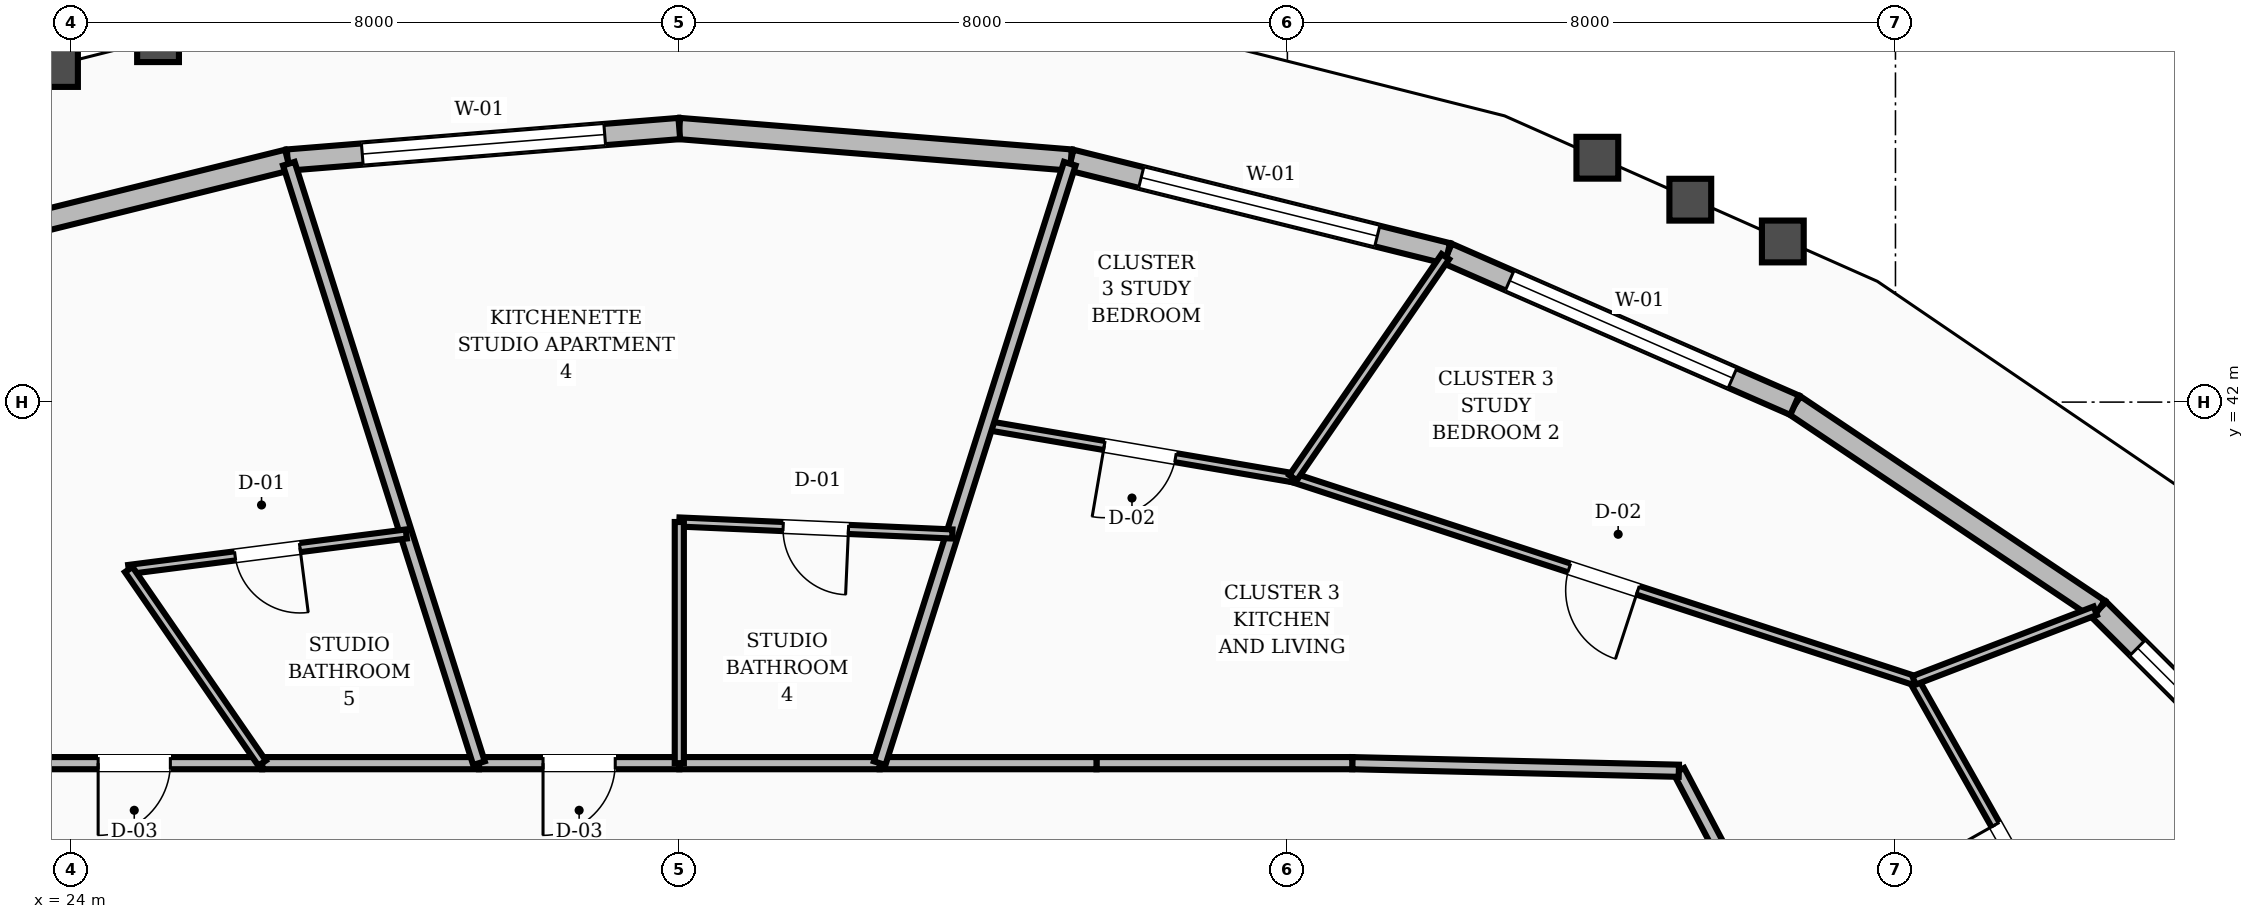
"""IFC4 building model, lengths in metres.
Left out: names, types, materials, properties, quantities, classifications, styles, units other than length and angle.
Written with IfcOpenShell. Run it as: python <this file> out.ifc"""

import sys

from ifc_helpers import new_model, si_unit, direction, frame, frame_2d, origin, place, context, subcontext, project, spatial, rectangle, extrude, element, fill, save


model = new_model("IFC4")
c1 = context("Model", 3, precision=1e-05, world=origin(), true_north=direction((0.0, 1.0)))
c2 = subcontext(c1, "Body", "Model", "MODEL_VIEW")
j1 = project(units=[si_unit("LENGTHUNIT", "METRE"), si_unit("PLANEANGLEUNIT", "RADIAN")], contexts=[c1])
p1 = place(None, origin())
s1 = spatial("IfcSite", under=j1, at=p1, CompositionType="ELEMENT")
p2 = place(p1, origin())
s2 = spatial("IfcBuilding", under=s1, at=p2, CompositionType="ELEMENT")
p3 = place(p2, frame((0.0, 0.0, 146.0)))
s3 = spatial("IfcBuildingStorey", under=s2, at=p3, CompositionType="ELEMENT", Elevation=146.0)
p4 = place(p3, frame((53.959, 36.0, 0.0), z_axis=(0.0, 0.0, 1.0), x_axis=(-0.708343047993, 0.70586834917, 0.0)))
e1 = element("IfcWall", 1, at=p4, inside=s3, PredefinedType="STANDARD", context=c2, shape_type="SweptSolid", body=[
    extrude(rectangle(XDim=4.637, YDim=0.28, at=frame_2d((2.318, 0.0))), origin(), (0.0, 0.0, 1.0), 2.82),
])
p5 = place(p4, frame((0.719, 0.0, 0.8)))
e2 = element("IfcOpeningElement", 2, at=p5, cuts=e1, PredefinedType="OPENING", context=c2, shape_type="SweptSolid", body=[
    extrude(rectangle(XDim=3.2, YDim=1.65, at=frame_2d((1.6, 0.825))), frame((0.0, 0.15, 0.0), z_axis=(0.0, -1.0, 0.0), x_axis=(1.0, 0.0, 0.0)), (0.0, 0.0, 1.0), 0.3),
])
p6 = place(p3, frame((50.675, 39.273, 0.0), z_axis=(0.0, 0.0, 1.0), x_axis=(-0.830308520581, 0.557304010977, 0.0)))
e3 = element("IfcWall", 3, at=p6, inside=s3, PredefinedType="STANDARD", context=c2, shape_type="SweptSolid", body=[
    extrude(rectangle(XDim=4.82, YDim=0.28, at=frame_2d((2.41, 0.0))), origin(), (0.0, 0.0, 1.0), 2.82),
])
p7 = place(p3, frame((46.673, 41.959, 0.0), z_axis=(0.0, 0.0, 1.0), x_axis=(-0.916285475586, 0.400525813438, 0.0)))
e4 = element("IfcWall", 4, at=p7, inside=s3, PredefinedType="STANDARD", context=c2, shape_type="SweptSolid", body=[
    extrude(rectangle(XDim=4.983, YDim=0.28, at=frame_2d((2.492, 0.0))), origin(), (0.0, 0.0, 1.0), 2.82),
])
p8 = place(p7, frame((0.892, 0.0, 0.8)))
e5 = element("IfcOpeningElement", 5, at=p8, cuts=e4, PredefinedType="OPENING", context=c2, shape_type="SweptSolid", body=[
    extrude(rectangle(XDim=3.2, YDim=1.65, at=frame_2d((1.6, 0.825))), frame((0.0, 0.15, 0.0), z_axis=(0.0, -1.0, 0.0), x_axis=(1.0, 0.0, 0.0)), (0.0, 0.0, 1.0), 0.3),
])
p9 = place(p3, frame((42.107, 43.955, 0.0), z_axis=(0.0, 0.0, 1.0), x_axis=(-0.970574196652, 0.240802260774, 0.0)))
e6 = element("IfcWall", 6, at=p9, inside=s3, PredefinedType="STANDARD", context=c2, shape_type="SweptSolid", body=[
    extrude(rectangle(XDim=5.105, YDim=0.28, at=frame_2d((2.552, 0.0))), origin(), (0.0, 0.0, 1.0), 2.82),
])
p10 = place(p9, frame((0.952, 0.0, 0.8)))
e7 = element("IfcOpeningElement", 7, at=p10, cuts=e6, PredefinedType="OPENING", context=c2, shape_type="SweptSolid", body=[
    extrude(rectangle(XDim=3.2, YDim=1.65, at=frame_2d((1.6, 0.825))), frame((0.0, 0.15, 0.0), z_axis=(0.0, -1.0, 0.0), x_axis=(1.0, 0.0, 0.0)), (0.0, 0.0, 1.0), 0.3),
])
p11 = place(p3, frame((37.152, 45.184, 0.0), z_axis=(0.0, 0.0, 1.0), x_axis=(-0.996771275463, 0.080293364684, 0.0)))
e8 = element("IfcWall", 8, at=p11, inside=s3, PredefinedType="STANDARD", context=c2, shape_type="SweptSolid", body=[
    extrude(rectangle(XDim=5.169, YDim=0.28, at=frame_2d((2.584, 0.0))), origin(), (0.0, 0.0, 1.0), 2.82),
])
p12 = place(p3, frame((32.0, 45.599, 0.0), z_axis=(0.0, 0.0, 1.0), x_axis=(-0.996771275463, -0.080293364684, 0.0)))
e9 = element("IfcWall", 9, at=p12, inside=s3, PredefinedType="STANDARD", context=c2, shape_type="SweptSolid", body=[
    extrude(rectangle(XDim=5.169, YDim=0.28, at=frame_2d((2.584, 0.0))), origin(), (0.0, 0.0, 1.0), 2.82),
])
p13 = place(p12, frame((0.985, 0.0, 0.8)))
e10 = element("IfcOpeningElement", 10, at=p13, cuts=e9, PredefinedType="OPENING", context=c2, shape_type="SweptSolid", body=[
    extrude(rectangle(XDim=3.2, YDim=1.65, at=frame_2d((1.6, 0.825))), frame((0.0, 0.15, 0.0), z_axis=(0.0, -1.0, 0.0), x_axis=(1.0, 0.0, 0.0)), (0.0, 0.0, 1.0), 0.3),
])
p14 = place(p3, frame((26.848, 45.184, 0.0), z_axis=(0.0, 0.0, 1.0), x_axis=(-0.970574196652, -0.240802260774, 0.0)))
e11 = element("IfcWall", 11, at=p14, inside=s3, PredefinedType="STANDARD", context=c2, shape_type="SweptSolid", body=[
    extrude(rectangle(XDim=5.105, YDim=0.28, at=frame_2d((2.552, 0.0))), origin(), (0.0, 0.0, 1.0), 2.82),
])
p15 = place(p3, frame((46.85, 33.923, 0.0), z_axis=(0.0, 0.0, 1.0), x_axis=(-0.466093963429, 0.884735224378, 0.0)))
e12 = element("IfcWall", 12, at=p15, inside=s3, PredefinedType="SOLIDWALL", context=c2, shape_type="SweptSolid", body=[
    extrude(rectangle(XDim=3.648, YDim=0.16, at=frame_2d((1.824, 0.0))), origin(), (0.0, 0.0, 1.0), 2.8),
])
p16 = place(p15, frame((1.324, 0.0, 0.0)))
e13 = element("IfcOpeningElement", 13, at=p16, cuts=e12, PredefinedType="OPENING", context=c2, shape_type="SweptSolid", body=[
    extrude(rectangle(XDim=1.0, YDim=2.1, at=frame_2d((0.5, 1.05))), frame((0.0, 0.09, 0.0), z_axis=(0.0, -1.0, 0.0), x_axis=(1.0, 0.0, 0.0)), (0.0, 0.0, 1.0), 0.18),
])
p17 = place(p3, frame((45.15, 37.15, 0.0), z_axis=(0.0, 0.0, 1.0), x_axis=(-0.999728709658, 0.023291781507, 0.0)))
e14 = element("IfcWall", 14, at=p17, inside=s3, PredefinedType="SOLIDWALL", context=c2, shape_type="SweptSolid", body=[
    extrude(rectangle(XDim=4.298, YDim=0.16, at=frame_2d((2.149, 0.0))), origin(), (0.0, 0.0, 1.0), 2.8),
])
p18 = place(p3, frame((40.854, 37.25, 0.0), z_axis=(0.0, 0.0, 1.0), x_axis=(-1.0, 0.0, 0.0)))
e15 = element("IfcWall", 15, at=p18, inside=s3, PredefinedType="SOLIDWALL", context=c2, shape_type="SweptSolid", body=[
    extrude(rectangle(XDim=3.365, YDim=0.16, at=frame_2d((1.683, 0.0))), origin(), (0.0, 0.0, 1.0), 2.8),
])
p19 = place(p3, frame((37.488, 37.25, 0.0), z_axis=(0.0, 0.0, 1.0), x_axis=(-1.0, 0.0, 0.0)))
e16 = element("IfcWall", 16, at=p19, inside=s3, PredefinedType="SOLIDWALL", context=c2, shape_type="SweptSolid", body=[
    extrude(rectangle(XDim=2.853, YDim=0.16, at=frame_2d((1.426, 0.0))), origin(), (0.0, 0.0, 1.0), 2.8),
])
p20 = place(p3, frame((34.635, 37.25, 0.0), z_axis=(0.0, 0.0, 1.0), x_axis=(-1.0, 0.0, 0.0)))
e17 = element("IfcWall", 17, at=p20, inside=s3, PredefinedType="SOLIDWALL", context=c2, shape_type="SweptSolid", body=[
    extrude(rectangle(XDim=2.635, YDim=0.16, at=frame_2d((1.318, 0.0))), origin(), (0.0, 0.0, 1.0), 2.8),
])
p21 = place(p3, frame((32.0, 37.25, 0.0), z_axis=(0.0, 0.0, 1.0), x_axis=(-1.0, 0.0, 0.0)))
e18 = element("IfcWall", 18, at=p21, inside=s3, PredefinedType="SOLIDWALL", context=c2, shape_type="SweptSolid", body=[
    extrude(rectangle(XDim=2.635, YDim=0.16, at=frame_2d((1.318, 0.0))), origin(), (0.0, 0.0, 1.0), 2.8),
])
p22 = place(p21, frame((0.843, 0.0, 0.0)))
e19 = element("IfcOpeningElement", 19, at=p22, cuts=e18, PredefinedType="OPENING", context=c2, shape_type="SweptSolid", body=[
    extrude(rectangle(XDim=0.95, YDim=2.1, at=frame_2d((0.475, 1.05))), frame((0.0, 0.09, 0.0), z_axis=(0.0, -1.0, 0.0), x_axis=(1.0, 0.0, 0.0)), (0.0, 0.0, 1.0), 0.18),
])
p23 = place(p3, frame((29.365, 37.25, 0.0), z_axis=(0.0, 0.0, 1.0), x_axis=(-1.0, 0.0, 0.0)))
e20 = element("IfcWall", 20, at=p23, inside=s3, PredefinedType="SOLIDWALL", context=c2, shape_type="SweptSolid", body=[
    extrude(rectangle(XDim=2.853, YDim=0.16, at=frame_2d((1.426, 0.0))), origin(), (0.0, 0.0, 1.0), 2.8),
])
p24 = place(p3, frame((26.512, 37.25, 0.0), z_axis=(0.0, 0.0, 1.0), x_axis=(-1.0, 0.0, 0.0)))
e21 = element("IfcWall", 21, at=p24, inside=s3, PredefinedType="SOLIDWALL", context=c2, shape_type="SweptSolid", body=[
    extrude(rectangle(XDim=3.365, YDim=0.16, at=frame_2d((1.683, 0.0))), origin(), (0.0, 0.0, 1.0), 2.8),
])
p25 = place(p24, frame((1.208, 0.0, 0.0)))
e22 = element("IfcOpeningElement", 22, at=p25, cuts=e21, PredefinedType="OPENING", context=c2, shape_type="SweptSolid", body=[
    extrude(rectangle(XDim=0.95, YDim=2.1, at=frame_2d((0.475, 1.05))), frame((0.0, 0.09, 0.0), z_axis=(0.0, -1.0, 0.0), x_axis=(1.0, 0.0, 0.0)), (0.0, 0.0, 1.0), 0.18),
])
p26 = place(p3, frame((52.198, 31.335, 0.0), z_axis=(0.0, 0.0, 1.0), x_axis=(-0.491634094676, 0.870801881574, 0.0)))
e23 = element("IfcWall", 23, at=p26, inside=s3, PredefinedType="PARTITIONING", context=c2, shape_type="SweptSolid", body=[
    extrude(rectangle(XDim=8.043, YDim=0.12, at=frame_2d((4.021, 0.0))), origin(), (0.0, 0.0, 1.0), 2.8),
])
p27 = place(p26, frame((4.913, 0.0, 0.0)))
e24 = element("IfcOpeningElement", 24, at=p27, cuts=e23, PredefinedType="OPENING", context=c2, shape_type="SweptSolid", body=[
    extrude(rectangle(XDim=0.95, YDim=2.1, at=frame_2d((0.475, 1.05))), frame((0.0, 0.07, 0.0), z_axis=(0.0, -1.0, 0.0), x_axis=(1.0, 0.0, 0.0)), (0.0, 0.0, 1.0), 0.14),
])
p28 = place(p3, frame((48.244, 38.339, 0.0), z_axis=(0.0, 0.0, 1.0), x_axis=(-0.950656085118, 0.310246688667, 0.0)))
e25 = element("IfcWall", 25, at=p28, inside=s3, PredefinedType="PARTITIONING", context=c2, shape_type="SweptSolid", body=[
    extrude(rectangle(XDim=8.593, YDim=0.12, at=frame_2d((4.297, 0.0))), origin(), (0.0, 0.0, 1.0), 2.8),
])
p29 = place(p28, frame((3.822, 0.0, 0.0)))
e26 = element("IfcOpeningElement", 26, at=p29, cuts=e25, PredefinedType="OPENING", context=c2, shape_type="SweptSolid", body=[
    extrude(rectangle(XDim=0.95, YDim=2.1, at=frame_2d((0.475, 1.05))), frame((0.0, 0.07, 0.0), z_axis=(0.0, -1.0, 0.0), x_axis=(1.0, 0.0, 0.0)), (0.0, 0.0, 1.0), 0.14),
])
p30 = place(p3, frame((48.244, 38.339, 0.0), z_axis=(0.0, 0.0, 1.0), x_axis=(0.933458867587, 0.358684460945, 0.0)))
e27 = element("IfcWall", 27, at=p30, inside=s3, PredefinedType="PARTITIONING", context=c2, shape_type="SweptSolid", body=[
    extrude(rectangle(XDim=2.554, YDim=0.12, at=frame_2d((1.277, 0.0))), origin(), (0.0, 0.0, 1.0), 2.8),
])
p31 = place(p3, frame((40.075, 41.005, 0.0), z_axis=(0.0, 0.0, 1.0), x_axis=(-0.985727483478, 0.16834882927, 0.0)))
e28 = element("IfcWall", 28, at=p31, inside=s3, PredefinedType="PARTITIONING", context=c2, shape_type="SweptSolid", body=[
    extrude(rectangle(XDim=4.088, YDim=0.12, at=frame_2d((2.044, 0.0))), origin(), (0.0, 0.0, 1.0), 2.8),
])
p32 = place(p31, frame((1.569, 0.0, 0.0)))
e29 = element("IfcOpeningElement", 29, at=p32, cuts=e28, PredefinedType="OPENING", context=c2, shape_type="SweptSolid", body=[
    extrude(rectangle(XDim=0.95, YDim=2.1, at=frame_2d((0.475, 1.05))), frame((0.0, 0.07, 0.0), z_axis=(0.0, -1.0, 0.0), x_axis=(1.0, 0.0, 0.0)), (0.0, 0.0, 1.0), 0.14),
])
p33 = place(p3, frame((40.075, 41.005, 0.0), z_axis=(0.0, 0.0, 1.0), x_axis=(0.56726774044, 0.8235334302, 0.0)))
e30 = element("IfcWall", 30, at=p33, inside=s3, PredefinedType="PARTITIONING", context=c2, shape_type="SweptSolid", body=[
    extrude(rectangle(XDim=3.532, YDim=0.12, at=frame_2d((1.766, 0.0))), origin(), (0.0, 0.0, 1.0), 2.8),
])
p34 = place(p3, frame((34.635, 37.25, 0.0), z_axis=(0.0, 0.0, 1.0), x_axis=(0.302358297893, 0.953194345186, 0.0)))
e31 = element("IfcWall", 31, at=p34, inside=s3, PredefinedType="SOLIDWALL", context=c2, shape_type="SweptSolid", body=[
    extrude(rectangle(XDim=8.274, YDim=0.16, at=frame_2d((4.137, 0.0))), origin(), (0.0, 0.0, 1.0), 2.8),
])
p35 = place(p3, frame((35.592, 40.265, 0.0), z_axis=(0.0, 0.0, 1.0), x_axis=(-0.999037490114, 0.043864488453, 0.0)))
e32 = element("IfcWall", 32, at=p35, inside=s3, PredefinedType="PARTITIONING", context=c2, shape_type="SweptSolid", body=[
    extrude(rectangle(XDim=3.595, YDim=0.12, at=frame_2d((1.798, 0.0))), origin(), (0.0, 0.0, 1.0), 2.8),
])
p36 = place(p35, frame((1.368, 0.0, 0.0)))
e33 = element("IfcOpeningElement", 33, at=p36, cuts=e32, PredefinedType="OPENING", context=c2, shape_type="SweptSolid", body=[
    extrude(rectangle(XDim=0.86, YDim=2.1, at=frame_2d((0.43, 1.05))), frame((0.0, 0.07, 0.0), z_axis=(0.0, -1.0, 0.0), x_axis=(1.0, 0.0, 0.0)), (0.0, 0.0, 1.0), 0.14),
])
p37 = place(p3, frame((32.0, 37.25, 0.0), z_axis=(0.0, 0.0, 1.0), x_axis=(0.0, 1.0, 0.0)))
e34 = element("IfcWall", 34, at=p37, inside=s3, PredefinedType="PARTITIONING", context=c2, shape_type="SweptSolid", body=[
    extrude(rectangle(XDim=3.173, YDim=0.12, at=frame_2d((1.586, 0.0))), origin(), (0.0, 0.0, 1.0), 2.8),
])
p38 = place(p3, frame((29.365, 37.25, 0.0), z_axis=(0.0, 0.0, 1.0), x_axis=(-0.302358297893, 0.953194345186, 0.0)))
e35 = element("IfcWall", 35, at=p38, inside=s3, PredefinedType="SOLIDWALL", context=c2, shape_type="SweptSolid", body=[
    extrude(rectangle(XDim=8.274, YDim=0.16, at=frame_2d((4.137, 0.0))), origin(), (0.0, 0.0, 1.0), 2.8),
])
p39 = place(p3, frame((28.408, 40.265, 0.0), z_axis=(0.0, 0.0, 1.0), x_axis=(-0.991927075006, -0.126809612691, 0.0)))
e36 = element("IfcWall", 36, at=p39, inside=s3, PredefinedType="PARTITIONING", context=c2, shape_type="SweptSolid", body=[
    extrude(rectangle(XDim=3.681, YDim=0.12, at=frame_2d((1.841, 0.0))), origin(), (0.0, 0.0, 1.0), 2.8),
])
p40 = place(p39, frame((1.41, 0.0, 0.0)))
e37 = element("IfcOpeningElement", 37, at=p40, cuts=e36, PredefinedType="OPENING", context=c2, shape_type="SweptSolid", body=[
    extrude(rectangle(XDim=0.86, YDim=2.1, at=frame_2d((0.43, 1.05))), frame((0.0, 0.07, 0.0), z_axis=(0.0, -1.0, 0.0), x_axis=(1.0, 0.0, 0.0)), (0.0, 0.0, 1.0), 0.14),
])
p41 = place(p3, frame((26.512, 37.25, 0.0), z_axis=(0.0, 0.0, 1.0), x_axis=(-0.567255291352, 0.823542005263, 0.0)))
e38 = element("IfcWall", 38, at=p41, inside=s3, PredefinedType="PARTITIONING", context=c2, shape_type="SweptSolid", body=[
    extrude(rectangle(XDim=3.094, YDim=0.12, at=frame_2d((1.547, 0.0))), origin(), (0.0, 0.0, 1.0), 2.8),
])
p42 = place(p5, origin())
e39 = element("IfcWindow", 39, at=p42, inside=s3, PartitioningType="SINGLE_PANEL", PredefinedType="WINDOW", context=c2, shape_type="SweptSolid", body=[
    extrude(rectangle(XDim=3.2, YDim=1.65, at=frame_2d((1.6, 0.825))), frame((0.0, 0.03, 0.0), z_axis=(0.0, -1.0, 0.0), x_axis=(1.0, 0.0, 0.0)), (0.0, 0.0, 1.0), 0.06),
])
fill(e2, e39)
p43 = place(p8, origin())
e40 = element("IfcWindow", 40, at=p43, inside=s3, PartitioningType="SINGLE_PANEL", PredefinedType="WINDOW", context=c2, shape_type="SweptSolid", body=[
    extrude(rectangle(XDim=3.2, YDim=1.65, at=frame_2d((1.6, 0.825))), frame((0.0, 0.03, 0.0), z_axis=(0.0, -1.0, 0.0), x_axis=(1.0, 0.0, 0.0)), (0.0, 0.0, 1.0), 0.06),
])
fill(e5, e40)
p44 = place(p10, origin())
e41 = element("IfcWindow", 41, at=p44, inside=s3, PartitioningType="SINGLE_PANEL", PredefinedType="WINDOW", context=c2, shape_type="SweptSolid", body=[
    extrude(rectangle(XDim=3.2, YDim=1.65, at=frame_2d((1.6, 0.825))), frame((0.0, 0.03, 0.0), z_axis=(0.0, -1.0, 0.0), x_axis=(1.0, 0.0, 0.0)), (0.0, 0.0, 1.0), 0.06),
])
fill(e7, e41)
p45 = place(p13, origin())
e42 = element("IfcWindow", 42, at=p45, inside=s3, PartitioningType="SINGLE_PANEL", PredefinedType="WINDOW", context=c2, shape_type="SweptSolid", body=[
    extrude(rectangle(XDim=3.2, YDim=1.65, at=frame_2d((1.6, 0.825))), frame((0.0, 0.03, 0.0), z_axis=(0.0, -1.0, 0.0), x_axis=(1.0, 0.0, 0.0)), (0.0, 0.0, 1.0), 0.06),
])
fill(e10, e42)
p46 = place(p27, origin())
e43 = element("IfcDoor", 43, at=p46, inside=s3, OperationType="SINGLE_SWING_RIGHT", PredefinedType="DOOR", context=c2, shape_type="SweptSolid", body=[
    extrude(rectangle(XDim=0.95, YDim=2.1, at=frame_2d((0.475, 1.05))), frame((0.0, 0.025, 0.0), z_axis=(0.0, -1.0, 0.0), x_axis=(1.0, 0.0, 0.0)), (0.0, 0.0, 1.0), 0.05),
])
fill(e24, e43)
p47 = place(p29, origin())
e44 = element("IfcDoor", 44, at=p47, inside=s3, OperationType="SINGLE_SWING_LEFT", PredefinedType="DOOR", context=c2, shape_type="SweptSolid", body=[
    extrude(rectangle(XDim=0.95, YDim=2.1, at=frame_2d((0.475, 1.05))), frame((0.0, 0.025, 0.0), z_axis=(0.0, -1.0, 0.0), x_axis=(1.0, 0.0, 0.0)), (0.0, 0.0, 1.0), 0.05),
])
fill(e26, e44)
p48 = place(p32, origin())
e45 = element("IfcDoor", 45, at=p48, inside=s3, OperationType="SINGLE_SWING_RIGHT", PredefinedType="DOOR", context=c2, shape_type="SweptSolid", body=[
    extrude(rectangle(XDim=0.95, YDim=2.1, at=frame_2d((0.475, 1.05))), frame((0.0, 0.025, 0.0), z_axis=(0.0, -1.0, 0.0), x_axis=(1.0, 0.0, 0.0)), (0.0, 0.0, 1.0), 0.05),
])
fill(e29, e45)
p49 = place(p36, origin())
e46 = element("IfcDoor", 46, at=p49, inside=s3, OperationType="SINGLE_SWING_LEFT", PredefinedType="DOOR", context=c2, shape_type="SweptSolid", body=[
    extrude(rectangle(XDim=0.86, YDim=2.1, at=frame_2d((0.43, 1.05))), frame((0.0, 0.025, 0.0), z_axis=(0.0, -1.0, 0.0), x_axis=(1.0, 0.0, 0.0)), (0.0, 0.0, 1.0), 0.05),
])
fill(e33, e46)
p50 = place(p22, origin())
e47 = element("IfcDoor", 47, at=p50, inside=s3, OperationType="SINGLE_SWING_RIGHT", PredefinedType="DOOR", context=c2, shape_type="SweptSolid", body=[
    extrude(rectangle(XDim=0.95, YDim=2.1, at=frame_2d((0.475, 1.05))), frame((0.0, 0.025, 0.0), z_axis=(0.0, -1.0, 0.0), x_axis=(1.0, 0.0, 0.0)), (0.0, 0.0, 1.0), 0.05),
])
fill(e19, e47)
p51 = place(p40, origin())
e48 = element("IfcDoor", 48, at=p51, inside=s3, OperationType="SINGLE_SWING_LEFT", PredefinedType="DOOR", context=c2, shape_type="SweptSolid", body=[
    extrude(rectangle(XDim=0.86, YDim=2.1, at=frame_2d((0.43, 1.05))), frame((0.0, 0.025, 0.0), z_axis=(0.0, -1.0, 0.0), x_axis=(1.0, 0.0, 0.0)), (0.0, 0.0, 1.0), 0.05),
])
fill(e37, e48)
p52 = place(p25, origin())
e49 = element("IfcDoor", 49, at=p52, inside=s3, OperationType="SINGLE_SWING_RIGHT", PredefinedType="DOOR", context=c2, shape_type="SweptSolid", body=[
    extrude(rectangle(XDim=0.95, YDim=2.1, at=frame_2d((0.475, 1.05))), frame((0.0, 0.025, 0.0), z_axis=(0.0, -1.0, 0.0), x_axis=(1.0, 0.0, 0.0)), (0.0, 0.0, 1.0), 0.05),
])
fill(e22, e49)
save(model, sys.argv[1])
